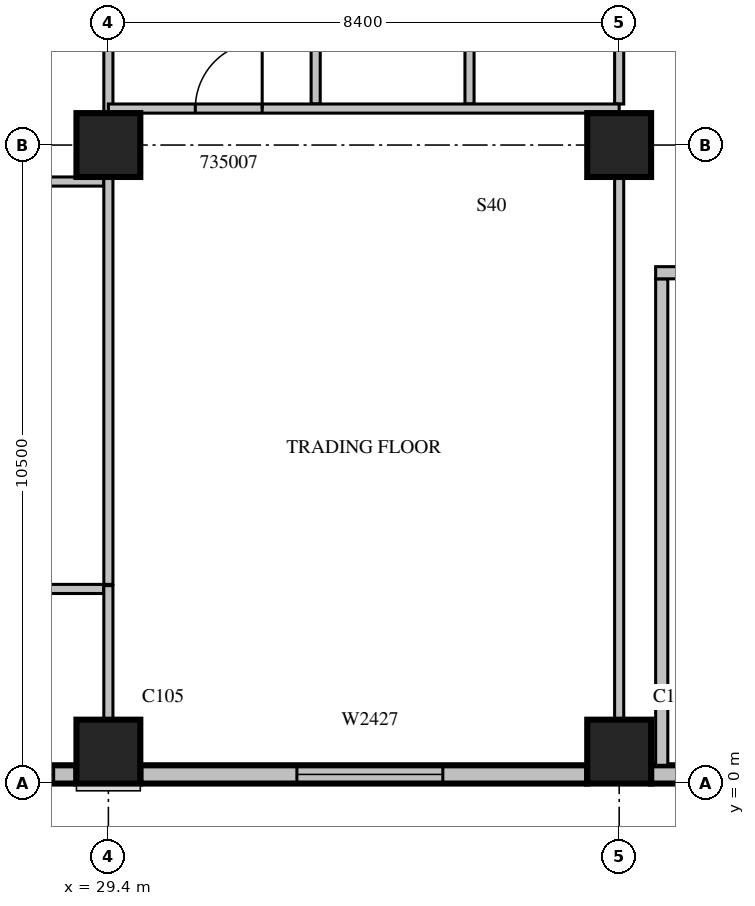
"""IFC4 building model, lengths in metres.
Left out: names, types, materials, properties, quantities, classifications, styles, units other than length and angle.
Written with IfcOpenShell. Run it as: python <this file> out.ifc"""

import sys

from ifc_helpers import new_model, si_unit, direction, frame, frame_2d, origin, origin_2d, place, context, subcontext, project, spatial, rectangle, extrude, source, transform, mapped, element, fill, save


model = new_model("IFC4")
c1 = context("Model", 3, precision=1e-05, world=origin(), true_north=direction((0.0, 1.0)))
c2 = subcontext(c1, "Body", "Model", "MODEL_VIEW")
j1 = project(units=[si_unit("LENGTHUNIT", "METRE"), si_unit("PLANEANGLEUNIT", "RADIAN")], contexts=[c1])
p1 = place(None, origin())
s1 = spatial("IfcSite", under=j1, at=p1, CompositionType="ELEMENT")
p2 = place(p1, origin())
s2 = spatial("IfcBuilding", under=s1, at=p2, CompositionType="ELEMENT")
p3 = place(p2, frame((0.0, 0.0, 158.1)))
s3 = spatial("IfcBuildingStorey", under=s2, at=p3, CompositionType="ELEMENT", Elevation=158.1)
m1 = source(origin(), c2, "Body", "SweptSolid", [
    extrude(rectangle(XDim=1.05, YDim=1.05, at=origin_2d()), origin(), (0.0, 0.0, 1.0), 4.2),
])
for number, where, z_axis, x_axis in (
    (1, (29.4, 0.525, 0.0), (0.0, 0.0, 1.0), (1.0, 0.0, 0.0)),
    (2, (37.8, 0.525, 0.0), (0.0, 0.0, 1.0), (1.0, 0.0, 0.0)),
    (3, (29.4, 10.5, 0.0), (0.0, 0.0, 1.0), (1.0, 0.0, 0.0)),
    (4, (37.8, 10.5, 0.0), (0.0, 0.0, 1.0), (1.0, 0.0, 0.0)),
):
    element("IfcColumn", number, at=place(p3, frame(where, z_axis=z_axis, x_axis=x_axis)), inside=s3, PredefinedType="COLUMN", context=c2, shape_type="MappedRepresentation", body=[
        mapped(m1, transform((0.0, 0.0, 0.0), scale=1.0)),
    ])
m2 = source(origin(), c2, "Body", "SweptSolid", [
    extrude(rectangle(XDim=7.35, YDim=0.3, at=frame_2d((3.675, 0.0))), origin(), (0.0, 0.0, 1.0), 3.8),
])
p4 = place(p3, frame((21.525, 0.15, 0.0), z_axis=(0.0, 0.0, 1.0), x_axis=(1.0, 0.0, 0.0)))
e5 = element("IfcWall", 5, at=p4, inside=s3, PredefinedType="STANDARD", context=c2, shape_type="MappedRepresentation", body=[
    mapped(m2, transform((0.0, 0.0, 0.0), scale=1.0)),
])
m3 = source(origin(), c2, "Body", "SweptSolid", [
    extrude(rectangle(XDim=2.4, YDim=2.7, at=frame_2d((1.2, 1.35))), frame((0.0, 0.16, 0.0), z_axis=(0.0, -1.0, 0.0), x_axis=(1.0, 0.0, 0.0)), (0.0, 0.0, 1.0), 0.32),
])
p5 = place(p4, frame((0.375, 0.0, 0.6)))
e6 = element("IfcOpeningElement", 6, at=p5, cuts=e5, PredefinedType="OPENING", context=c2, shape_type="MappedRepresentation", body=[
    mapped(m3, transform((0.0, 0.0, 0.0), scale=1.0)),
])
p6 = place(p4, frame((4.575, 0.0, 0.6)))
e7 = element("IfcOpeningElement", 7, at=p6, cuts=e5, PredefinedType="OPENING", context=c2, shape_type="MappedRepresentation", body=[
    mapped(m3, transform((0.0, 0.0, 0.0), scale=1.0)),
])
p7 = place(p3, frame((29.925, 0.15, 0.0), z_axis=(0.0, 0.0, 1.0), x_axis=(1.0, 0.0, 0.0)))
e8 = element("IfcWall", 8, at=p7, inside=s3, PredefinedType="STANDARD", context=c2, shape_type="MappedRepresentation", body=[
    mapped(m2, transform((0.0, 0.0, 0.0), scale=1.0)),
])
p8 = place(p7, frame((2.575, 0.0, 0.6)))
e9 = element("IfcOpeningElement", 9, at=p8, cuts=e8, PredefinedType="OPENING", context=c2, shape_type="MappedRepresentation", body=[
    mapped(m3, transform((0.0, 0.0, 0.0), scale=1.0)),
])
m4 = source(origin(), c2, "Body", "SweptSolid", [
    extrude(rectangle(XDim=1.875, YDim=0.3, at=frame_2d((0.938, 0.0))), origin(), (0.0, 0.0, 1.0), 3.8),
])
p9 = place(p3, frame((38.325, 0.15, 0.0), z_axis=(0.0, 0.0, 1.0), x_axis=(1.0, 0.0, 0.0)))
e10 = element("IfcWall", 10, at=p9, inside=s3, PredefinedType="STANDARD", context=c2, shape_type="MappedRepresentation", body=[
    mapped(m4, transform((0.0, 0.0, 0.0), scale=1.0)),
])
m5 = source(origin(), c2, "Body", "SweptSolid", [
    extrude(rectangle(XDim=8.0, YDim=0.2, at=frame_2d((4.0, 0.0))), origin(), (0.0, 0.0, 1.0), 3.8),
])
p10 = place(p3, frame((38.5, 0.3, 0.0), z_axis=(0.0, 0.0, 1.0), x_axis=(0.0, 1.0, 0.0)))
e11 = element("IfcWall", 11, at=p10, inside=s3, PredefinedType="PARTITIONING", context=c2, shape_type="MappedRepresentation", body=[
    mapped(m5, transform((0.0, 0.0, 0.0), scale=1.0)),
])
m6 = source(origin(), c2, "Body", "SweptSolid", [
    extrude(rectangle(XDim=5.45, YDim=0.2, at=frame_2d((2.725, 0.0))), origin(), (0.0, 0.0, 1.0), 3.8),
])
p11 = place(p3, frame((38.4, 8.4, 0.0), z_axis=(0.0, 0.0, 1.0), x_axis=(1.0, 0.0, 0.0)))
e12 = element("IfcWall", 12, at=p11, inside=s3, PredefinedType="PARTITIONING", context=c2, shape_type="MappedRepresentation", body=[
    mapped(m6, transform((0.0, 0.0, 0.0), scale=1.0)),
])
m7 = source(origin(), c2, "Body", "SweptSolid", [
    extrude(rectangle(XDim=1.2, YDim=2.1, at=frame_2d((0.6, 1.05))), frame((0.0, 0.11, 0.0), z_axis=(0.0, -1.0, 0.0), x_axis=(1.0, 0.0, 0.0)), (0.0, 0.0, 1.0), 0.22),
])
p12 = place(p11, frame((0.4, 0.0, 0.0)))
e13 = element("IfcOpeningElement", 13, at=p12, cuts=e12, PredefinedType="OPENING", context=c2, shape_type="MappedRepresentation", body=[
    mapped(m7, transform((0.0, 0.0, 0.0), scale=1.0)),
])
m8 = source(origin(), c2, "Body", "SweptSolid", [
    extrude(rectangle(XDim=0.9, YDim=2.1, at=frame_2d((0.45, 1.05))), frame((0.0, 0.11, 0.0), z_axis=(0.0, -1.0, 0.0), x_axis=(1.0, 0.0, 0.0)), (0.0, 0.0, 1.0), 0.22),
])
p13 = place(p11, frame((3.25, 0.0, 0.0)))
e14 = element("IfcOpeningElement", 14, at=p13, cuts=e12, PredefinedType="OPENING", context=c2, shape_type="MappedRepresentation", body=[
    mapped(m8, transform((0.0, 0.0, 0.0), scale=1.0)),
])
m9 = source(origin(), c2, "Body", "SweptSolid", [
    extrude(rectangle(XDim=5.35, YDim=0.15, at=frame_2d((2.675, 0.0))), origin(), (0.0, 0.0, 1.0), 3.8),
])
p14 = place(p3, frame((29.325, 9.9, 0.0), z_axis=(0.0, 0.0, 1.0), x_axis=(-1.0, 0.0, 0.0)))
e15 = element("IfcWall", 15, at=p14, inside=s3, PredefinedType="PARTITIONING", context=c2, shape_type="MappedRepresentation", body=[
    mapped(m9, transform((0.0, 0.0, 0.0), scale=1.0)),
])
m10 = source(origin(), c2, "Body", "SweptSolid", [
    extrude(rectangle(XDim=6.701, YDim=0.15, at=frame_2d((3.35, 0.0))), origin(), (0.0, 0.0, 1.0), 3.8),
])
p15 = place(p3, frame((29.4, 3.275, 0.0), z_axis=(0.0, 0.0, 1.0), x_axis=(0.0, 1.0, 0.0)))
e16 = element("IfcWall", 16, at=p15, inside=s3, PredefinedType="PARTITIONING", context=c2, shape_type="MappedRepresentation", body=[
    mapped(m10, transform((0.0, 0.0, 0.0), scale=1.0)),
])
m11 = source(origin(), c2, "Body", "SweptSolid", [
    extrude(rectangle(XDim=3.676, YDim=0.15, at=frame_2d((1.838, 0.0))), origin(), (0.0, 0.0, 1.0), 3.8),
])
p16 = place(p3, frame((29.4, 11.024, 0.0), z_axis=(0.0, 0.0, 1.0), x_axis=(0.0, 1.0, 0.0)))
e17 = element("IfcWall", 17, at=p16, inside=s3, PredefinedType="PARTITIONING", context=c2, shape_type="MappedRepresentation", body=[
    mapped(m11, transform((0.0, 0.0, 0.0), scale=1.0)),
])
m12 = source(origin(), c2, "Body", "SweptSolid", [
    extrude(rectangle(XDim=7.325, YDim=0.15, at=frame_2d((3.663, 0.0))), origin(), (0.0, 0.0, 1.0), 3.8),
])
p17 = place(p3, frame((22.0, 3.2, 0.0), z_axis=(0.0, 0.0, 1.0), x_axis=(1.0, 0.0, 0.0)))
e18 = element("IfcWall", 18, at=p17, inside=s3, PredefinedType="PARTITIONING", context=c2, shape_type="MappedRepresentation", body=[
    mapped(m12, transform((0.0, 0.0, 0.0), scale=1.0)),
])
m13 = source(origin(), c2, "Body", "SweptSolid", [
    extrude(rectangle(XDim=1.0, YDim=2.1, at=frame_2d((0.5, 1.05))), frame((0.0, 0.085, 0.0), z_axis=(0.0, -1.0, 0.0), x_axis=(1.0, 0.0, 0.0)), (0.0, 0.0, 1.0), 0.17),
])
p18 = place(p17, frame((3.2, 0.0, 0.0)))
e19 = element("IfcOpeningElement", 19, at=p18, cuts=e18, PredefinedType="OPENING", context=c2, shape_type="MappedRepresentation", body=[
    mapped(m13, transform((0.0, 0.0, 0.0), scale=1.0)),
])
m14 = source(origin(), c2, "Body", "SweptSolid", [
    extrude(rectangle(XDim=0.9, YDim=2.1, at=frame_2d((0.45, 1.05))), frame((0.0, 0.085, 0.0), z_axis=(0.0, -1.0, 0.0), x_axis=(1.0, 0.0, 0.0)), (0.0, 0.0, 1.0), 0.17),
])
p19 = place(p17, frame((2.213, 0.0, 0.0)))
e20 = element("IfcOpeningElement", 20, at=p19, cuts=e18, PredefinedType="OPENING", context=c2, shape_type="MappedRepresentation", body=[
    mapped(m14, transform((0.0, 0.0, 0.0), scale=1.0)),
])
m15 = source(origin(), c2, "Body", "SweptSolid", [
    extrude(rectangle(XDim=3.525, YDim=0.15, at=frame_2d((1.762, 0.0))), origin(), (0.0, 0.0, 1.0), 3.8),
])
for number, where, z_axis, x_axis in (
    (21, (32.809, 11.175, 0.0), (0.0, 0.0, 1.0), (0.0, 1.0, 0.0)),
    (22, (35.339, 11.175, 0.0), (0.0, 0.0, 1.0), (0.0, 1.0, 0.0)),
):
    element("IfcWall", number, at=place(p3, frame(where, z_axis=z_axis, x_axis=x_axis)), inside=s3, PredefinedType="PARTITIONING", context=c2, shape_type="MappedRepresentation", body=[
        mapped(m15, transform((0.0, 0.0, 0.0), scale=1.0)),
    ])
m16 = source(origin(), c2, "Body", "SweptSolid", [
    extrude(rectangle(XDim=2.206, YDim=0.15, at=frame_2d((1.103, 0.0))), origin(), (0.0, 0.0, 1.0), 3.8),
])
p20 = place(p3, frame((29.4, 1.049, 0.0), z_axis=(0.0, 0.0, 1.0), x_axis=(0.0, 1.0, 0.0)))
e23 = element("IfcWall", 23, at=p20, inside=s3, PredefinedType="PARTITIONING", context=c2, shape_type="MappedRepresentation", body=[
    mapped(m16, transform((0.0, 0.0, 0.0), scale=1.0)),
])
m17 = source(origin(), c2, "Body", "SweptSolid", [
    extrude(rectangle(XDim=8.927, YDim=0.15, at=frame_2d((4.463, 0.0))), origin(), (0.0, 0.0, 1.0), 3.8),
])
p21 = place(p3, frame((37.8, 1.049, 0.0), z_axis=(0.0, 0.0, 1.0), x_axis=(0.0, 1.0, 0.0)))
e24 = element("IfcWall", 24, at=p21, inside=s3, PredefinedType="PARTITIONING", context=c2, shape_type="MappedRepresentation", body=[
    mapped(m17, transform((0.0, 0.0, 0.0), scale=1.0)),
])
p22 = place(p3, frame((37.8, 11.175, 0.0), z_axis=(0.0, 0.0, 1.0), x_axis=(0.0, 1.0, 0.0)))
e25 = element("IfcWall", 25, at=p22, inside=s3, PredefinedType="PARTITIONING", context=c2, shape_type="MappedRepresentation", body=[
    mapped(m15, transform((0.0, 0.0, 0.0), scale=1.0)),
])
m18 = source(origin(), c2, "Body", "SweptSolid", [
    extrude(rectangle(XDim=8.4, YDim=0.15, at=frame_2d((4.2, 0.0))), origin(), (0.0, 0.0, 1.0), 3.8),
])
p23 = place(p3, frame((37.8, 11.1, 0.0), z_axis=(0.0, 0.0, 1.0), x_axis=(-1.0, 0.0, 0.0)))
e26 = element("IfcWall", 26, at=p23, inside=s3, PredefinedType="PARTITIONING", context=c2, shape_type="MappedRepresentation", body=[
    mapped(m18, transform((0.0, 0.0, 0.0), scale=1.0)),
])
m19 = source(origin(), c2, "Body", "SweptSolid", [
    extrude(rectangle(XDim=1.1, YDim=2.1, at=frame_2d((0.55, 1.05))), frame((0.0, 0.085, 0.0), z_axis=(0.0, -1.0, 0.0), x_axis=(1.0, 0.0, 0.0)), (0.0, 0.0, 1.0), 0.17),
])
p24 = place(p23, frame((5.871, 0.0, 0.0)))
e27 = element("IfcOpeningElement", 27, at=p24, cuts=e26, PredefinedType="OPENING", context=c2, shape_type="MappedRepresentation", body=[
    mapped(m19, transform((0.0, 0.0, 0.0), scale=1.0)),
])
m20 = source(origin(), c2, "Body", "SweptSolid", [
    extrude(rectangle(XDim=2.4, YDim=2.7, at=frame_2d((1.2, 1.35))), frame((0.0, 0.03, 0.0), z_axis=(0.0, -1.0, 0.0), x_axis=(1.0, 0.0, 0.0)), (0.0, 0.0, 1.0), 0.06),
])
p25 = place(p6, origin())
e28 = element("IfcWindow", 28, at=p25, inside=s3, PartitioningType="SINGLE_PANEL", PredefinedType="WINDOW", context=c2, shape_type="MappedRepresentation", body=[
    mapped(m20, transform((0.0, 0.0, 0.0), scale=1.0)),
])
fill(e7, e28)
p26 = place(p8, origin())
e29 = element("IfcWindow", 29, at=p26, inside=s3, PartitioningType="SINGLE_PANEL", PredefinedType="WINDOW", context=c2, shape_type="MappedRepresentation", body=[
    mapped(m20, transform((0.0, 0.0, 0.0), scale=1.0)),
])
fill(e9, e29)
m21 = source(origin(), c2, "Body", "SweptSolid", [
    extrude(rectangle(XDim=1.1, YDim=2.1, at=frame_2d((0.55, 1.05))), frame((0.0, 0.025, 0.0), z_axis=(0.0, -1.0, 0.0), x_axis=(1.0, 0.0, 0.0)), (0.0, 0.0, 1.0), 0.05),
])
p27 = place(p24, origin())
e30 = element("IfcDoor", 30, at=p27, inside=s3, OperationType="SINGLE_SWING_RIGHT", PredefinedType="DOOR", context=c2, shape_type="MappedRepresentation", body=[
    mapped(m21, transform((0.0, 0.0, 0.0), scale=1.0)),
])
fill(e27, e30)
save(model, sys.argv[1])
